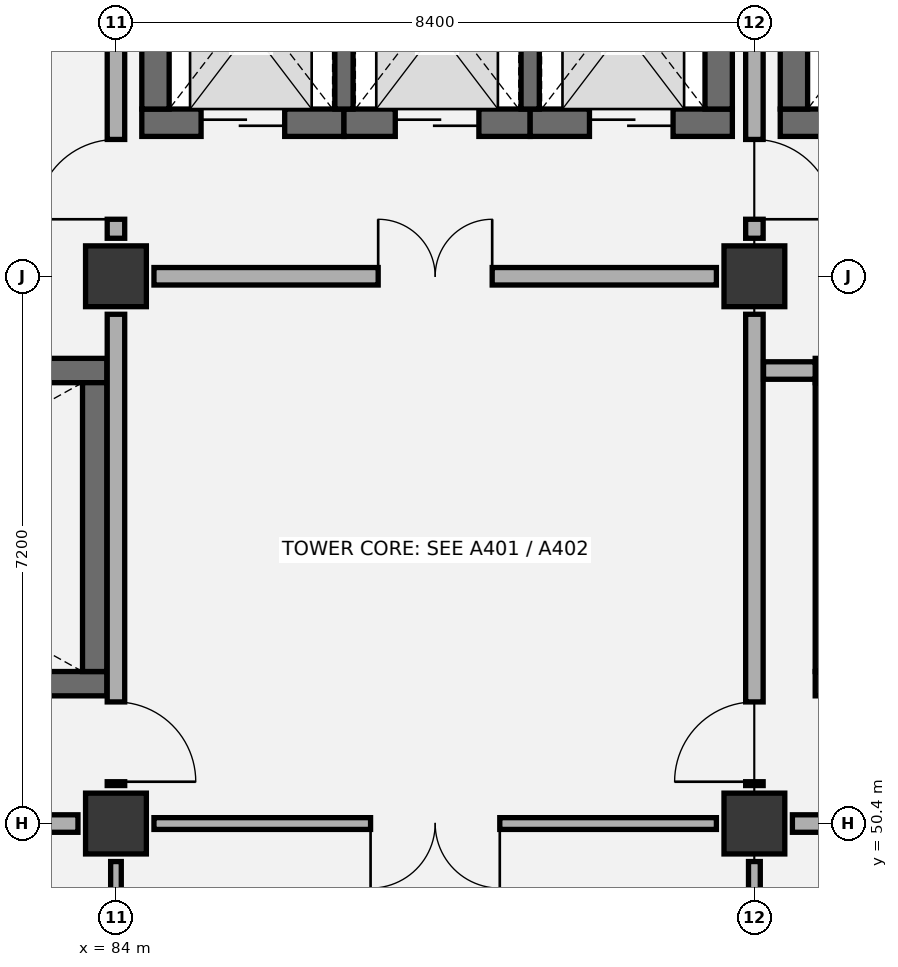
"""IFC4 building model, lengths in metres.
Left out: names, types, materials, properties, quantities, classifications, styles, units other than length and angle.
Written with IfcOpenShell. Run it as: python <this file> out.ifc"""

import sys

from ifc_helpers import new_model, si_unit, direction, frame, frame_2d, origin, origin_2d, place, context, subcontext, project, spatial, rectangle, extrude, element, fill, save


model = new_model("IFC4")
c1 = context("Model", 3, precision=1e-05, world=origin(), true_north=direction((0.0, 1.0)))
c2 = subcontext(c1, "Body", "Model", "MODEL_VIEW")
j1 = project(units=[si_unit("LENGTHUNIT", "METRE"), si_unit("PLANEANGLEUNIT", "RADIAN")], contexts=[c1])
p1 = place(None, origin())
s1 = spatial("IfcSite", under=j1, at=p1, CompositionType="ELEMENT")
p2 = place(p1, origin())
s2 = spatial("IfcBuilding", under=s1, at=p2, CompositionType="ELEMENT")
p3 = place(p2, frame((0.0, 0.0, 22.2)))
s3 = spatial("IfcBuildingStorey", under=s2, at=p3, CompositionType="ELEMENT", Elevation=22.2)
for number, where, z_axis, x_axis in (
    (1, (84.0, 50.4, 0.0), (0.0, 0.0, 1.0), (1.0, 0.0, 0.0)),
    (2, (84.0, 57.6, 0.0), (0.0, 0.0, 1.0), (1.0, 0.0, 0.0)),
    (3, (92.4, 50.4, 0.0), (0.0, 0.0, 1.0), (1.0, 0.0, 0.0)),
    (4, (92.4, 57.6, 0.0), (0.0, 0.0, 1.0), (1.0, 0.0, 0.0)),
):
    element("IfcColumn", number, at=place(p3, frame(where, z_axis=z_axis, x_axis=x_axis)), inside=s3, PredefinedType="COLUMN", context=c2, shape_type="SweptSolid", body=[
        extrude(rectangle(XDim=0.8, YDim=0.8, at=origin_2d()), origin(), (0.0, 0.0, 1.0), 4.8),
    ])
p4 = place(p3, frame((76.4, 52.24, 0.0), z_axis=(0.0, 0.0, 1.0), x_axis=(1.0, 0.0, 0.0)))
e5 = element("IfcWall", 5, at=p4, inside=s3, PredefinedType="SHEAR", context=c2, shape_type="SweptSolid", body=[
    extrude(rectangle(XDim=7.48, YDim=0.32, at=frame_2d((3.74, 0.0))), origin(), (0.0, 0.0, 1.0), 4.52),
])
p5 = place(p4, frame((0.45, 0.0, 0.0)))
e6 = element("IfcOpeningElement", 6, at=p5, cuts=e5, PredefinedType="OPENING", context=c2, shape_type="SweptSolid", body=[
    extrude(rectangle(XDim=1.05, YDim=2.15, at=frame_2d((0.525, 1.075))), frame((0.0, 0.17, 0.0), z_axis=(0.0, -1.0, 0.0), x_axis=(1.0, 0.0, 0.0)), (0.0, 0.0, 1.0), 0.34),
])
p6 = place(p3, frame((76.4, 56.36, 0.0), z_axis=(0.0, 0.0, 1.0), x_axis=(1.0, 0.0, 0.0)))
e7 = element("IfcWall", 7, at=p6, inside=s3, PredefinedType="SHEAR", context=c2, shape_type="SweptSolid", body=[
    extrude(rectangle(XDim=7.48, YDim=0.32, at=frame_2d((3.74, 0.0))), origin(), (0.0, 0.0, 1.0), 4.52),
])
p7 = place(p3, frame((83.72, 52.4, 0.0), z_axis=(0.0, 0.0, 1.0), x_axis=(0.0, 1.0, 0.0)))
e8 = element("IfcWall", 8, at=p7, inside=s3, PredefinedType="SHEAR", context=c2, shape_type="SweptSolid", body=[
    extrude(rectangle(XDim=3.8, YDim=0.32, at=frame_2d((1.9, 0.0))), origin(), (0.0, 0.0, 1.0), 4.52),
])
p8 = place(p3, frame((93.2, 52.24, 0.0), z_axis=(0.0, 0.0, 1.0), x_axis=(1.0, 0.0, 0.0)))
e9 = element("IfcWall", 9, at=p8, inside=s3, PredefinedType="SHEAR", context=c2, shape_type="SweptSolid", body=[
    extrude(rectangle(XDim=7.48, YDim=0.32, at=frame_2d((3.74, 0.0))), origin(), (0.0, 0.0, 1.0), 4.52),
])
p9 = place(p8, frame((0.45, 0.0, 0.0)))
e10 = element("IfcOpeningElement", 10, at=p9, cuts=e9, PredefinedType="OPENING", context=c2, shape_type="SweptSolid", body=[
    extrude(rectangle(XDim=1.05, YDim=2.15, at=frame_2d((0.525, 1.075))), frame((0.0, 0.17, 0.0), z_axis=(0.0, -1.0, 0.0), x_axis=(1.0, 0.0, 0.0)), (0.0, 0.0, 1.0), 0.34),
])
p10 = place(p3, frame((93.2, 56.36, 0.0), z_axis=(0.0, 0.0, 1.0), x_axis=(1.0, 0.0, 0.0)))
e11 = element("IfcWall", 11, at=p10, inside=s3, PredefinedType="SHEAR", context=c2, shape_type="SweptSolid", body=[
    extrude(rectangle(XDim=7.48, YDim=0.32, at=frame_2d((3.74, 0.0))), origin(), (0.0, 0.0, 1.0), 4.52),
])
p11 = place(p3, frame((93.36, 52.4, 0.0), z_axis=(0.0, 0.0, 1.0), x_axis=(0.0, 1.0, 0.0)))
e12 = element("IfcWall", 12, at=p11, inside=s3, PredefinedType="SHEAR", context=c2, shape_type="SweptSolid", body=[
    extrude(rectangle(XDim=3.8, YDim=0.32, at=frame_2d((1.9, 0.0))), origin(), (0.0, 0.0, 1.0), 4.52),
])
p12 = place(p3, frame((84.34, 59.62, 0.0), z_axis=(0.0, 0.0, 1.0), x_axis=(1.0, 0.0, 0.0)))
e13 = element("IfcWall", 13, at=p12, inside=s3, PredefinedType="SHEAR", context=c2, shape_type="SweptSolid", body=[
    extrude(rectangle(XDim=2.66, YDim=0.36, at=frame_2d((1.33, 0.0))), origin(), (0.0, 0.0, 1.0), 4.52),
])
p13 = place(p12, frame((0.78, 0.0, 0.0)))
e14 = element("IfcOpeningElement", 14, at=p13, cuts=e13, PredefinedType="OPENING", context=c2, shape_type="SweptSolid", body=[
    extrude(rectangle(XDim=1.1, YDim=2.15, at=frame_2d((0.55, 1.075))), frame((0.0, 0.19, 0.0), z_axis=(0.0, -1.0, 0.0), x_axis=(1.0, 0.0, 0.0)), (0.0, 0.0, 1.0), 0.38),
])
p14 = place(p3, frame((87.0, 59.62, 0.0), z_axis=(0.0, 0.0, 1.0), x_axis=(1.0, 0.0, 0.0)))
e15 = element("IfcWall", 15, at=p14, inside=s3, PredefinedType="SHEAR", context=c2, shape_type="SweptSolid", body=[
    extrude(rectangle(XDim=2.45, YDim=0.36, at=frame_2d((1.225, 0.0))), origin(), (0.0, 0.0, 1.0), 4.52),
])
p15 = place(p14, frame((0.675, 0.0, 0.0)))
e16 = element("IfcOpeningElement", 16, at=p15, cuts=e15, PredefinedType="OPENING", context=c2, shape_type="SweptSolid", body=[
    extrude(rectangle(XDim=1.1, YDim=2.15, at=frame_2d((0.55, 1.075))), frame((0.0, 0.19, 0.0), z_axis=(0.0, -1.0, 0.0), x_axis=(1.0, 0.0, 0.0)), (0.0, 0.0, 1.0), 0.38),
])
p16 = place(p3, frame((89.45, 59.62, 0.0), z_axis=(0.0, 0.0, 1.0), x_axis=(1.0, 0.0, 0.0)))
e17 = element("IfcWall", 17, at=p16, inside=s3, PredefinedType="SHEAR", context=c2, shape_type="SweptSolid", body=[
    extrude(rectangle(XDim=2.66, YDim=0.36, at=frame_2d((1.33, 0.0))), origin(), (0.0, 0.0, 1.0), 4.52),
])
p17 = place(p16, frame((0.78, 0.0, 0.0)))
e18 = element("IfcOpeningElement", 18, at=p17, cuts=e17, PredefinedType="OPENING", context=c2, shape_type="SweptSolid", body=[
    extrude(rectangle(XDim=1.1, YDim=2.15, at=frame_2d((0.55, 1.075))), frame((0.0, 0.19, 0.0), z_axis=(0.0, -1.0, 0.0), x_axis=(1.0, 0.0, 0.0)), (0.0, 0.0, 1.0), 0.38),
])
for number, where, z_axis, x_axis in (
    (19, (84.52, 59.8, 0.0), (0.0, 0.0, 1.0), (0.0, 1.0, 0.0)),
    (20, (91.93, 59.8, 0.0), (0.0, 0.0, 1.0), (0.0, 1.0, 0.0)),
):
    element("IfcWall", number, at=place(p3, frame(where, z_axis=z_axis, x_axis=x_axis)), inside=s3, PredefinedType="SHEAR", context=c2, shape_type="SweptSolid", body=[
        extrude(rectangle(XDim=2.8, YDim=0.36, at=frame_2d((1.4, 0.0))), origin(), (0.0, 0.0, 1.0), 4.52),
    ])
for number, where, z_axis, x_axis in (
    (21, (87.0, 59.8, 0.0), (0.0, 0.0, 1.0), (0.0, 1.0, 0.0)),
    (22, (89.45, 59.8, 0.0), (0.0, 0.0, 1.0), (0.0, 1.0, 0.0)),
):
    element("IfcWall", number, at=place(p3, frame(where, z_axis=z_axis, x_axis=x_axis)), inside=s3, PredefinedType="SHEAR", context=c2, shape_type="SweptSolid", body=[
        extrude(rectangle(XDim=2.8, YDim=0.24, at=frame_2d((1.4, 0.0))), origin(), (0.0, 0.0, 1.0), 4.52),
    ])
p18 = place(p3, frame((92.74, 59.62, 0.0), z_axis=(0.0, 0.0, 1.0), x_axis=(1.0, 0.0, 0.0)))
e23 = element("IfcWall", 23, at=p18, inside=s3, PredefinedType="SHEAR", context=c2, shape_type="SweptSolid", body=[
    extrude(rectangle(XDim=2.87, YDim=0.36, at=frame_2d((1.435, 0.0))), origin(), (0.0, 0.0, 1.0), 4.52),
])
p19 = place(p18, frame((0.76, 0.0, 0.0)))
e24 = element("IfcOpeningElement", 24, at=p19, cuts=e23, PredefinedType="OPENING", context=c2, shape_type="SweptSolid", body=[
    extrude(rectangle(XDim=1.35, YDim=2.2, at=frame_2d((0.675, 1.1))), frame((0.0, 0.19, 0.0), z_axis=(0.0, -1.0, 0.0), x_axis=(1.0, 0.0, 0.0)), (0.0, 0.0, 1.0), 0.38),
])
p20 = place(p3, frame((92.92, 59.8, 0.0), z_axis=(0.0, 0.0, 1.0), x_axis=(0.0, 1.0, 0.0)))
e25 = element("IfcWall", 25, at=p20, inside=s3, PredefinedType="SHEAR", context=c2, shape_type="SweptSolid", body=[
    extrude(rectangle(XDim=2.8, YDim=0.36, at=frame_2d((1.4, 0.0))), origin(), (0.0, 0.0, 1.0), 4.52),
])
p21 = place(p3, frame((84.0, 43.7, 0.0), z_axis=(0.0, 0.0, 1.0), x_axis=(0.0, 1.0, 0.0)))
e26 = element("IfcWall", 26, at=p21, inside=s3, PredefinedType="PARTITIONING", context=c2, shape_type="SweptSolid", body=[
    extrude(rectangle(XDim=6.2, YDim=0.14, at=frame_2d((3.1, 0.0))), origin(), (0.0, 0.0, 1.0), 4.225),
])
p22 = place(p21, frame((2.25, 0.0, 0.0)))
e27 = element("IfcOpeningElement", 27, at=p22, cuts=e26, PredefinedType="OPENING", context=c2, shape_type="SweptSolid", body=[
    extrude(rectangle(XDim=1.7, YDim=2.25, at=frame_2d((0.85, 1.125))), frame((0.0, 0.08, 0.0), z_axis=(0.0, -1.0, 0.0), x_axis=(1.0, 0.0, 0.0)), (0.0, 0.0, 1.0), 0.16),
])
p23 = place(p3, frame((76.1, 50.4, 0.0), z_axis=(0.0, 0.0, 1.0), x_axis=(1.0, 0.0, 0.0)))
e28 = element("IfcWall", 28, at=p23, inside=s3, PredefinedType="PARTITIONING", context=c2, shape_type="SweptSolid", body=[
    extrude(rectangle(XDim=7.4, YDim=0.23, at=frame_2d((3.7, 0.0))), origin(), (0.0, 0.0, 1.0), 3.815),
])
p24 = place(p23, frame((2.95, 0.0, 0.0)))
e29 = element("IfcOpeningElement", 29, at=p24, cuts=e28, PredefinedType="OPENING", context=c2, shape_type="SweptSolid", body=[
    extrude(rectangle(XDim=1.5, YDim=2.15, at=frame_2d((0.75, 1.075))), frame((0.0, 0.125, 0.0), z_axis=(0.0, -1.0, 0.0), x_axis=(1.0, 0.0, 0.0)), (0.0, 0.0, 1.0), 0.25),
])
p25 = place(p3, frame((84.0, 50.9, 0.0), z_axis=(0.0, 0.0, 1.0), x_axis=(0.0, 1.0, 0.0)))
e30 = element("IfcWall", 30, at=p25, inside=s3, PredefinedType="PARTITIONING", context=c2, shape_type="SweptSolid", body=[
    extrude(rectangle(XDim=6.2, YDim=0.23, at=frame_2d((3.1, 0.0))), origin(), (0.0, 0.0, 1.0), 3.865),
])
p26 = place(p25, frame((0.05, 0.0, 0.0)))
e31 = element("IfcOpeningElement", 31, at=p26, cuts=e30, PredefinedType="OPENING", context=c2, shape_type="SweptSolid", body=[
    extrude(rectangle(XDim=1.05, YDim=2.15, at=frame_2d((0.525, 1.075))), frame((0.0, 0.125, 0.0), z_axis=(0.0, -1.0, 0.0), x_axis=(1.0, 0.0, 0.0)), (0.0, 0.0, 1.0), 0.25),
])
p27 = place(p3, frame((84.0, 58.1, 0.0), z_axis=(0.0, 0.0, 1.0), x_axis=(0.0, 1.0, 0.0)))
e32 = element("IfcWall", 32, at=p27, inside=s3, PredefinedType="PARTITIONING", context=c2, shape_type="SweptSolid", body=[
    extrude(rectangle(XDim=6.2, YDim=0.23, at=frame_2d((3.1, 0.0))), origin(), (0.0, 0.0, 1.0), 4.015),
])
p28 = place(p27, frame((0.25, 0.0, 0.0)))
e33 = element("IfcOpeningElement", 33, at=p28, cuts=e32, PredefinedType="OPENING", context=c2, shape_type="SweptSolid", body=[
    extrude(rectangle(XDim=1.05, YDim=2.15, at=frame_2d((0.525, 1.075))), frame((0.0, 0.125, 0.0), z_axis=(0.0, -1.0, 0.0), x_axis=(1.0, 0.0, 0.0)), (0.0, 0.0, 1.0), 0.25),
])
p29 = place(p3, frame((92.4, 43.7, 0.0), z_axis=(0.0, 0.0, 1.0), x_axis=(0.0, 1.0, 0.0)))
e34 = element("IfcWall", 34, at=p29, inside=s3, PredefinedType="PARTITIONING", context=c2, shape_type="SweptSolid", body=[
    extrude(rectangle(XDim=6.2, YDim=0.155, at=frame_2d((3.1, 0.0))), origin(), (0.0, 0.0, 1.0), 3.865),
])
p30 = place(p29, frame((2.4, 0.0, 0.0)))
e35 = element("IfcOpeningElement", 35, at=p30, cuts=e34, PredefinedType="OPENING", context=c2, shape_type="SweptSolid", body=[
    extrude(rectangle(XDim=1.4, YDim=2.15, at=frame_2d((0.7, 1.075))), frame((0.0, 0.087, 0.0), z_axis=(0.0, -1.0, 0.0), x_axis=(1.0, 0.0, 0.0)), (0.0, 0.0, 1.0), 0.175),
])
p31 = place(p3, frame((84.5, 50.4, 0.0), z_axis=(0.0, 0.0, 1.0), x_axis=(1.0, 0.0, 0.0)))
e36 = element("IfcWall", 36, at=p31, inside=s3, PredefinedType="PARTITIONING", context=c2, shape_type="SweptSolid", body=[
    extrude(rectangle(XDim=7.4, YDim=0.155, at=frame_2d((3.7, 0.0))), origin(), (0.0, 0.0, 1.0), 3.815),
])
p32 = place(p31, frame((2.85, 0.0, 0.0)))
e37 = element("IfcOpeningElement", 37, at=p32, cuts=e36, PredefinedType="OPENING", context=c2, shape_type="SweptSolid", body=[
    extrude(rectangle(XDim=1.7, YDim=2.25, at=frame_2d((0.85, 1.125))), frame((0.0, 0.087, 0.0), z_axis=(0.0, -1.0, 0.0), x_axis=(1.0, 0.0, 0.0)), (0.0, 0.0, 1.0), 0.175),
])
p33 = place(p3, frame((92.4, 50.9, 0.0), z_axis=(0.0, 0.0, 1.0), x_axis=(0.0, 1.0, 0.0)))
e38 = element("IfcWall", 38, at=p33, inside=s3, PredefinedType="PARTITIONING", context=c2, shape_type="SweptSolid", body=[
    extrude(rectangle(XDim=6.2, YDim=0.23, at=frame_2d((3.1, 0.0))), origin(), (0.0, 0.0, 1.0), 4.015),
])
p34 = place(p33, frame((0.05, 0.0, 0.0)))
e39 = element("IfcOpeningElement", 39, at=p34, cuts=e38, PredefinedType="OPENING", context=c2, shape_type="SweptSolid", body=[
    extrude(rectangle(XDim=1.05, YDim=2.15, at=frame_2d((0.525, 1.075))), frame((0.0, 0.125, 0.0), z_axis=(0.0, -1.0, 0.0), x_axis=(1.0, 0.0, 0.0)), (0.0, 0.0, 1.0), 0.25),
])
p35 = place(p3, frame((84.5, 57.6, 0.0), z_axis=(0.0, 0.0, 1.0), x_axis=(1.0, 0.0, 0.0)))
e40 = element("IfcWall", 40, at=p35, inside=s3, PredefinedType="PARTITIONING", context=c2, shape_type="SweptSolid", body=[
    extrude(rectangle(XDim=7.4, YDim=0.23, at=frame_2d((3.7, 0.0))), origin(), (0.0, 0.0, 1.0), 3.815),
])
p36 = place(p35, frame((2.95, 0.0, 0.0)))
e41 = element("IfcOpeningElement", 41, at=p36, cuts=e40, PredefinedType="OPENING", context=c2, shape_type="SweptSolid", body=[
    extrude(rectangle(XDim=1.5, YDim=2.15, at=frame_2d((0.75, 1.075))), frame((0.0, 0.125, 0.0), z_axis=(0.0, -1.0, 0.0), x_axis=(1.0, 0.0, 0.0)), (0.0, 0.0, 1.0), 0.25),
])
p37 = place(p3, frame((92.4, 58.1, 0.0), z_axis=(0.0, 0.0, 1.0), x_axis=(0.0, 1.0, 0.0)))
e42 = element("IfcWall", 42, at=p37, inside=s3, PredefinedType="PARTITIONING", context=c2, shape_type="SweptSolid", body=[
    extrude(rectangle(XDim=6.2, YDim=0.23, at=frame_2d((3.1, 0.0))), origin(), (0.0, 0.0, 1.0), 3.865),
])
p38 = place(p37, frame((0.25, 0.0, 0.0)))
e43 = element("IfcOpeningElement", 43, at=p38, cuts=e42, PredefinedType="OPENING", context=c2, shape_type="SweptSolid", body=[
    extrude(rectangle(XDim=1.05, YDim=2.15, at=frame_2d((0.525, 1.075))), frame((0.0, 0.125, 0.0), z_axis=(0.0, -1.0, 0.0), x_axis=(1.0, 0.0, 0.0)), (0.0, 0.0, 1.0), 0.25),
])
p39 = place(p3, frame((92.9, 50.4, 0.0), z_axis=(0.0, 0.0, 1.0), x_axis=(1.0, 0.0, 0.0)))
e44 = element("IfcWall", 44, at=p39, inside=s3, PredefinedType="PARTITIONING", context=c2, shape_type="SweptSolid", body=[
    extrude(rectangle(XDim=7.4, YDim=0.23, at=frame_2d((3.7, 0.0))), origin(), (0.0, 0.0, 1.0), 3.815),
])
p40 = place(p39, frame((2.95, 0.0, 0.0)))
e45 = element("IfcOpeningElement", 45, at=p40, cuts=e44, PredefinedType="OPENING", context=c2, shape_type="SweptSolid", body=[
    extrude(rectangle(XDim=1.5, YDim=2.15, at=frame_2d((0.75, 1.075))), frame((0.0, 0.125, 0.0), z_axis=(0.0, -1.0, 0.0), x_axis=(1.0, 0.0, 0.0)), (0.0, 0.0, 1.0), 0.25),
])
p41 = place(p3, frame((92.52, 56.36, 0.0), z_axis=(0.0, 0.0, 1.0), x_axis=(1.0, 0.0, 0.0)))
e46 = element("IfcWall", 46, at=p41, inside=s3, PredefinedType="PARTITIONING", context=c2, shape_type="SweptSolid", body=[
    extrude(rectangle(XDim=0.68, YDim=0.23, at=frame_2d((0.34, 0.0))), origin(), (0.0, 0.0, 1.0), 4.52),
])
p42 = place(p13, origin())
e47 = element("IfcDoor", 47, at=p42, inside=s3, OperationType="DOUBLE_DOOR_SLIDING", PredefinedType="DOOR", context=c2, shape_type="SweptSolid", body=[
    extrude(rectangle(XDim=1.1, YDim=2.15, at=frame_2d((0.55, 1.075))), frame((0.0, 0.025, 0.0), z_axis=(0.0, -1.0, 0.0), x_axis=(1.0, 0.0, 0.0)), (0.0, 0.0, 1.0), 0.05),
])
fill(e14, e47)
p43 = place(p15, origin())
e48 = element("IfcDoor", 48, at=p43, inside=s3, OperationType="DOUBLE_DOOR_SLIDING", PredefinedType="DOOR", context=c2, shape_type="SweptSolid", body=[
    extrude(rectangle(XDim=1.1, YDim=2.15, at=frame_2d((0.55, 1.075))), frame((0.0, 0.025, 0.0), z_axis=(0.0, -1.0, 0.0), x_axis=(1.0, 0.0, 0.0)), (0.0, 0.0, 1.0), 0.05),
])
fill(e16, e48)
p44 = place(p17, origin())
e49 = element("IfcDoor", 49, at=p44, inside=s3, OperationType="DOUBLE_DOOR_SLIDING", PredefinedType="DOOR", context=c2, shape_type="SweptSolid", body=[
    extrude(rectangle(XDim=1.1, YDim=2.15, at=frame_2d((0.55, 1.075))), frame((0.0, 0.025, 0.0), z_axis=(0.0, -1.0, 0.0), x_axis=(1.0, 0.0, 0.0)), (0.0, 0.0, 1.0), 0.05),
])
fill(e18, e49)
p45 = place(p26, frame((1.05, 0.0, 0.0), z_axis=(0.0, 0.0, 1.0), x_axis=(-1.0, 0.0, 0.0)))
e50 = element("IfcDoor", 50, at=p45, inside=s3, OperationType="SINGLE_SWING_RIGHT", PredefinedType="DOOR", context=c2, shape_type="SweptSolid", body=[
    extrude(rectangle(XDim=1.05, YDim=2.15, at=frame_2d((0.525, 1.075))), frame((0.0, 0.025, 0.0), z_axis=(0.0, -1.0, 0.0), x_axis=(1.0, 0.0, 0.0)), (0.0, 0.0, 1.0), 0.05),
])
fill(e31, e50)
p46 = place(p28, origin())
e51 = element("IfcDoor", 51, at=p46, inside=s3, OperationType="SINGLE_SWING_LEFT", PredefinedType="DOOR", context=c2, shape_type="SweptSolid", body=[
    extrude(rectangle(XDim=1.05, YDim=2.15, at=frame_2d((0.525, 1.075))), frame((0.0, 0.025, 0.0), z_axis=(0.0, -1.0, 0.0), x_axis=(1.0, 0.0, 0.0)), (0.0, 0.0, 1.0), 0.05),
])
fill(e33, e51)
p47 = place(p32, frame((1.7, 0.0, 0.0), z_axis=(0.0, 0.0, 1.0), x_axis=(-1.0, 0.0, 0.0)))
e52 = element("IfcDoor", 52, at=p47, inside=s3, OperationType="DOUBLE_DOOR_SINGLE_SWING", PredefinedType="DOOR", context=c2, shape_type="SweptSolid", body=[
    extrude(rectangle(XDim=1.7, YDim=2.25, at=frame_2d((0.85, 1.125))), frame((0.0, 0.025, 0.0), z_axis=(0.0, -1.0, 0.0), x_axis=(1.0, 0.0, 0.0)), (0.0, 0.0, 1.0), 0.05),
])
fill(e37, e52)
p48 = place(p34, origin())
e53 = element("IfcDoor", 53, at=p48, inside=s3, OperationType="SINGLE_SWING_LEFT", PredefinedType="DOOR", context=c2, shape_type="SweptSolid", body=[
    extrude(rectangle(XDim=1.05, YDim=2.15, at=frame_2d((0.525, 1.075))), frame((0.0, 0.025, 0.0), z_axis=(0.0, -1.0, 0.0), x_axis=(1.0, 0.0, 0.0)), (0.0, 0.0, 1.0), 0.05),
])
fill(e39, e53)
p49 = place(p36, origin())
e54 = element("IfcDoor", 54, at=p49, inside=s3, OperationType="DOUBLE_DOOR_SINGLE_SWING", PredefinedType="DOOR", context=c2, shape_type="SweptSolid", body=[
    extrude(rectangle(XDim=1.5, YDim=2.15, at=frame_2d((0.75, 1.075))), frame((0.0, 0.025, 0.0), z_axis=(0.0, -1.0, 0.0), x_axis=(1.0, 0.0, 0.0)), (0.0, 0.0, 1.0), 0.05),
])
fill(e41, e54)
p50 = place(p38, frame((1.05, 0.0, 0.0), z_axis=(0.0, 0.0, 1.0), x_axis=(-1.0, 0.0, 0.0)))
e55 = element("IfcDoor", 55, at=p50, inside=s3, OperationType="SINGLE_SWING_RIGHT", PredefinedType="DOOR", context=c2, shape_type="SweptSolid", body=[
    extrude(rectangle(XDim=1.05, YDim=2.15, at=frame_2d((0.525, 1.075))), frame((0.0, 0.025, 0.0), z_axis=(0.0, -1.0, 0.0), x_axis=(1.0, 0.0, 0.0)), (0.0, 0.0, 1.0), 0.05),
])
fill(e43, e55)
save(model, sys.argv[1])
